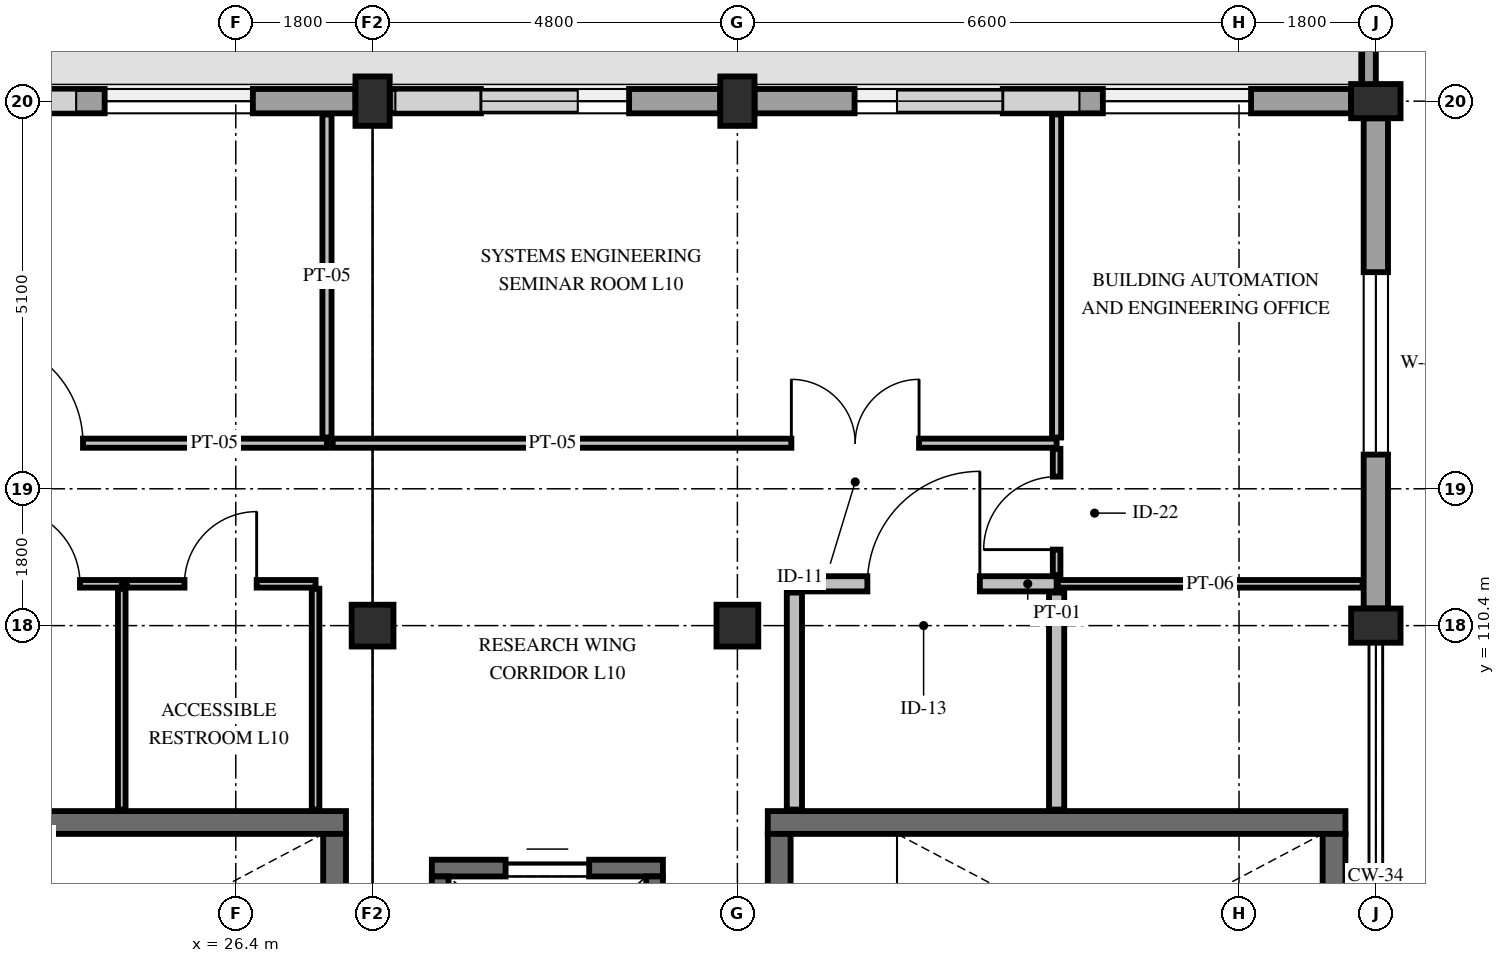
"""IFC4 building model, lengths in metres.
Left out: names, types, materials, properties, quantities, classifications, styles, units other than length and angle.
Written with IfcOpenShell. Run it as: python <this file> out.ifc"""

import sys

from ifc_helpers import new_model, si_unit, direction, frame, frame_2d, origin, origin_2d, place, context, subcontext, project, spatial, rectangle, extrude, element, fill, save


model = new_model("IFC4")
c1 = context("Model", 3, precision=1e-05, world=origin(), true_north=direction((0.0, 1.0)))
c2 = subcontext(c1, "Body", "Model", "MODEL_VIEW")
j1 = project(units=[si_unit("LENGTHUNIT", "METRE"), si_unit("PLANEANGLEUNIT", "RADIAN")], contexts=[c1])
p1 = place(None, origin())
s1 = spatial("IfcSite", under=j1, at=p1, CompositionType="ELEMENT")
p2 = place(p1, origin())
s2 = spatial("IfcBuilding", under=s1, at=p2, CompositionType="ELEMENT")
p3 = place(p2, frame((0.0, 0.0, 46.8)))
s3 = spatial("IfcBuildingStorey", under=s2, at=p3, CompositionType="ELEMENT", Elevation=46.8)
p4 = place(p3, frame((28.2, 110.4, 0.0), z_axis=(0.0, 0.0, 1.0), x_axis=(1.0, 0.0, 0.0)))
e1 = element("IfcColumn", 1, at=p4, inside=s3, PredefinedType="COLUMN", context=c2, shape_type="SweptSolid", body=[
    extrude(rectangle(XDim=0.55, YDim=0.55, at=origin_2d()), origin(), (0.0, 0.0, 1.0), 4.2),
])
p5 = place(p3, frame((28.2, 117.3, 0.0), z_axis=(0.0, 0.0, 1.0), x_axis=(1.0, 0.0, 0.0)))
e2 = element("IfcColumn", 2, at=p5, inside=s3, PredefinedType="PILASTER", context=c2, shape_type="SweptSolid", body=[
    extrude(rectangle(XDim=0.45, YDim=0.65, at=origin_2d()), origin(), (0.0, 0.0, 1.0), 4.2),
])
p6 = place(p3, frame((33.0, 110.4, 0.0), z_axis=(0.0, 0.0, 1.0), x_axis=(1.0, 0.0, 0.0)))
e3 = element("IfcColumn", 3, at=p6, inside=s3, PredefinedType="COLUMN", context=c2, shape_type="SweptSolid", body=[
    extrude(rectangle(XDim=0.55, YDim=0.55, at=origin_2d()), origin(), (0.0, 0.0, 1.0), 4.2),
])
for number, where, z_axis, x_axis in (
    (4, (33.0, 117.3, 0.0), (0.0, 0.0, 1.0), (1.0, 0.0, 0.0)),
    (5, (41.4, 110.4, 0.0), (0.0, 0.0, 1.0), (0.0, 1.0, 0.0)),
    (6, (41.4, 117.3, 0.0), (0.0, 0.0, 1.0), (0.0, 1.0, 0.0)),
):
    element("IfcColumn", number, at=place(p3, frame(where, z_axis=z_axis, x_axis=x_axis)), inside=s3, PredefinedType="PILASTER", context=c2, shape_type="SweptSolid", body=[
        extrude(rectangle(XDim=0.45, YDim=0.65, at=origin_2d()), origin(), (0.0, 0.0, 1.0), 4.2),
    ])
p7 = place(p3, frame((20.025, 117.3, 0.0), z_axis=(0.0, 0.0, 1.0), x_axis=(1.0, 0.0, 0.0)))
e7 = element("IfcWall", 7, at=p7, inside=s3, PredefinedType="STANDARD", context=c2, shape_type="SweptSolid", body=[
    extrude(rectangle(XDim=7.95, YDim=0.32, at=frame_2d((3.975, 0.0))), origin(), (0.0, 0.0, 1.0), 3.33),
])
p8 = place(p7, frame((1.35, 0.0, 0.65)))
e8 = element("IfcOpeningElement", 8, at=p8, cuts=e7, PredefinedType="OPENING", context=c2, shape_type="SweptSolid", body=[
    extrude(rectangle(XDim=1.95, YDim=2.24, at=frame_2d((0.975, 1.12))), frame((0.0, 0.175, 0.0), z_axis=(0.0, -1.0, 0.0), x_axis=(1.0, 0.0, 0.0)), (0.0, 0.0, 1.0), 0.35),
])
p9 = place(p7, frame((4.65, 0.0, 0.65)))
e9 = element("IfcOpeningElement", 9, at=p9, cuts=e7, PredefinedType="OPENING", context=c2, shape_type="SweptSolid", body=[
    extrude(rectangle(XDim=1.95, YDim=2.24, at=frame_2d((0.975, 1.12))), frame((0.0, 0.175, 0.0), z_axis=(0.0, -1.0, 0.0), x_axis=(1.0, 0.0, 0.0)), (0.0, 0.0, 1.0), 0.35),
])
p10 = place(p3, frame((28.425, 117.3, 0.0), z_axis=(0.0, 0.0, 1.0), x_axis=(1.0, 0.0, 0.0)))
e10 = element("IfcWall", 10, at=p10, inside=s3, PredefinedType="STANDARD", context=c2, shape_type="SweptSolid", body=[
    extrude(rectangle(XDim=4.35, YDim=0.32, at=frame_2d((2.175, 0.0))), origin(), (0.0, 0.0, 1.0), 3.35),
])
p11 = place(p10, frame((1.2, 0.0, 0.65)))
e11 = element("IfcOpeningElement", 11, at=p11, cuts=e10, PredefinedType="OPENING", context=c2, shape_type="SweptSolid", body=[
    extrude(rectangle(XDim=1.95, YDim=2.24, at=frame_2d((0.975, 1.12))), frame((0.0, 0.175, 0.0), z_axis=(0.0, -1.0, 0.0), x_axis=(1.0, 0.0, 0.0)), (0.0, 0.0, 1.0), 0.35),
])
p12 = place(p3, frame((33.225, 117.3, 0.0), z_axis=(0.0, 0.0, 1.0), x_axis=(1.0, 0.0, 0.0)))
e12 = element("IfcWall", 12, at=p12, inside=s3, PredefinedType="STANDARD", context=c2, shape_type="SweptSolid", body=[
    extrude(rectangle(XDim=7.85, YDim=0.32, at=frame_2d((3.925, 0.0))), origin(), (0.0, 0.0, 1.0), 3.33),
])
p13 = place(p12, frame((1.317, 0.0, 0.65)))
e13 = element("IfcOpeningElement", 13, at=p13, cuts=e12, PredefinedType="OPENING", context=c2, shape_type="SweptSolid", body=[
    extrude(rectangle(XDim=1.95, YDim=2.24, at=frame_2d((0.975, 1.12))), frame((0.0, 0.175, 0.0), z_axis=(0.0, -1.0, 0.0), x_axis=(1.0, 0.0, 0.0)), (0.0, 0.0, 1.0), 0.35),
])
p14 = place(p12, frame((4.583, 0.0, 0.65)))
e14 = element("IfcOpeningElement", 14, at=p14, cuts=e12, PredefinedType="OPENING", context=c2, shape_type="SweptSolid", body=[
    extrude(rectangle(XDim=1.95, YDim=2.24, at=frame_2d((0.975, 1.12))), frame((0.0, 0.175, 0.0), z_axis=(0.0, -1.0, 0.0), x_axis=(1.0, 0.0, 0.0)), (0.0, 0.0, 1.0), 0.35),
])
p15 = place(p3, frame((41.4, 117.075, 0.0), z_axis=(0.0, 0.0, 1.0), x_axis=(0.0, -1.0, 0.0)))
e15 = element("IfcWall", 15, at=p15, inside=s3, PredefinedType="STANDARD", context=c2, shape_type="SweptSolid", body=[
    extrude(rectangle(XDim=6.45, YDim=0.32, at=frame_2d((3.225, 0.0))), origin(), (0.0, 0.0, 1.0), 3.23),
])
p16 = place(p15, frame((2.025, 0.0, 0.65)))
e16 = element("IfcOpeningElement", 16, at=p16, cuts=e15, PredefinedType="OPENING", context=c2, shape_type="SweptSolid", body=[
    extrude(rectangle(XDim=2.4, YDim=2.24, at=frame_2d((1.2, 1.12))), frame((0.0, 0.175, 0.0), z_axis=(0.0, -1.0, 0.0), x_axis=(1.0, 0.0, 0.0)), (0.0, 0.0, 1.0), 0.35),
])
p17 = place(p3, frame((41.31, 117.48, 0.0), z_axis=(0.0, 0.0, 1.0), x_axis=(0.0, 1.0, 0.0)))
e17 = element("IfcWall", 17, at=p17, inside=s3, PredefinedType="PARAPET", context=c2, shape_type="SweptSolid", body=[
    extrude(rectangle(XDim=4.44, YDim=0.18, at=frame_2d((2.22, 0.0))), origin(), (0.0, 0.0, 1.0), 1.12),
])
p18 = place(p3, frame((20.25, 107.81, 0.0), z_axis=(0.0, 0.0, 1.0), x_axis=(1.0, 0.0, 0.0)))
e18 = element("IfcWall", 18, at=p18, inside=s3, PredefinedType="SHEAR", context=c2, shape_type="SweptSolid", body=[
    extrude(rectangle(XDim=7.6, YDim=0.3, at=frame_2d((3.8, 0.0))), origin(), (0.0, 0.0, 1.0), 3.94),
])
p19 = place(p3, frame((27.7, 104.7, 0.0), z_axis=(0.0, 0.0, 1.0), x_axis=(0.0, 1.0, 0.0)))
e19 = element("IfcWall", 19, at=p19, inside=s3, PredefinedType="SHEAR", context=c2, shape_type="SweptSolid", body=[
    extrude(rectangle(XDim=2.96, YDim=0.3, at=frame_2d((1.48, 0.0))), origin(), (0.0, 0.0, 1.0), 3.94),
])
p20 = place(p3, frame((33.4, 107.81, 0.0), z_axis=(0.0, 0.0, 1.0), x_axis=(1.0, 0.0, 0.0)))
e20 = element("IfcWall", 20, at=p20, inside=s3, PredefinedType="SHEAR", context=c2, shape_type="SweptSolid", body=[
    extrude(rectangle(XDim=7.6, YDim=0.3, at=frame_2d((3.8, 0.0))), origin(), (0.0, 0.0, 1.0), 3.94),
])
p21 = place(p3, frame((33.55, 104.7, 0.0), z_axis=(0.0, 0.0, 1.0), x_axis=(0.0, 1.0, 0.0)))
e21 = element("IfcWall", 21, at=p21, inside=s3, PredefinedType="SHEAR", context=c2, shape_type="SweptSolid", body=[
    extrude(rectangle(XDim=2.96, YDim=0.3, at=frame_2d((1.48, 0.0))), origin(), (0.0, 0.0, 1.0), 3.94),
])
p22 = place(p21, frame((0.94, 0.0, 0.0)))
e22 = element("IfcOpeningElement", 22, at=p22, cuts=e21, PredefinedType="OPENING", context=c2, shape_type="SweptSolid", body=[
    extrude(rectangle(XDim=1.08, YDim=2.2, at=frame_2d((0.54, 1.1))), frame((0.0, 0.165, 0.0), z_axis=(0.0, -1.0, 0.0), x_axis=(1.0, 0.0, 0.0)), (0.0, 0.0, 1.0), 0.33),
])
p23 = place(p3, frame((40.85, 104.7, 0.0), z_axis=(0.0, 0.0, 1.0), x_axis=(0.0, 1.0, 0.0)))
e23 = element("IfcWall", 23, at=p23, inside=s3, PredefinedType="SHEAR", context=c2, shape_type="SweptSolid", body=[
    extrude(rectangle(XDim=2.96, YDim=0.3, at=frame_2d((1.48, 0.0))), origin(), (0.0, 0.0, 1.0), 3.94),
])
p24 = place(p3, frame((28.98, 107.21, 0.0), z_axis=(0.0, 0.0, 1.0), x_axis=(1.0, 0.0, 0.0)))
e24 = element("IfcWall", 24, at=p24, inside=s3, PredefinedType="SHEAR", context=c2, shape_type="SweptSolid", body=[
    extrude(rectangle(XDim=3.04, YDim=0.22, at=frame_2d((1.52, 0.0))), origin(), (0.0, 0.0, 1.0), 3.94),
])
p25 = place(p24, frame((0.97, 0.0, 0.0)))
e25 = element("IfcOpeningElement", 25, at=p25, cuts=e24, PredefinedType="OPENING", context=c2, shape_type="SweptSolid", body=[
    extrude(rectangle(XDim=1.1, YDim=2.2, at=frame_2d((0.55, 1.1))), frame((0.0, 0.125, 0.0), z_axis=(0.0, -1.0, 0.0), x_axis=(1.0, 0.0, 0.0)), (0.0, 0.0, 1.0), 0.25),
])
for number, where, z_axis, x_axis in (
    (26, (29.09, 104.7, 0.0), (0.0, 0.0, 1.0), (0.0, 1.0, 0.0)),
    (27, (31.91, 104.7, 0.0), (0.0, 0.0, 1.0), (0.0, 1.0, 0.0)),
):
    element("IfcWall", number, at=place(p3, frame(where, z_axis=z_axis, x_axis=x_axis)), inside=s3, PredefinedType="SHEAR", context=c2, shape_type="SweptSolid", body=[
        extrude(rectangle(XDim=2.4, YDim=0.22, at=frame_2d((1.2, 0.0))), origin(), (0.0, 0.0, 1.0), 3.94),
    ])
p26 = place(p3, frame((22.815, 110.95, 0.0), z_axis=(0.0, 0.0, 1.0), x_axis=(1.0, 0.0, 0.0)))
e28 = element("IfcWall", 28, at=p26, inside=s3, PredefinedType="PARTITIONING", context=c2, shape_type="SweptSolid", body=[
    extrude(rectangle(XDim=2.085, YDim=0.1, at=frame_2d((1.042, 0.0))), origin(), (0.0, 0.0, 1.0), 3.9),
])
p27 = place(p26, frame((0.535, 0.0, 0.0)))
e29 = element("IfcOpeningElement", 29, at=p27, cuts=e28, PredefinedType="OPENING", context=c2, shape_type="SweptSolid", body=[
    extrude(rectangle(XDim=1.0, YDim=2.15, at=frame_2d((0.5, 1.075))), frame((0.0, 0.065, 0.0), z_axis=(0.0, -1.0, 0.0), x_axis=(1.0, 0.0, 0.0)), (0.0, 0.0, 1.0), 0.13),
])
p28 = place(p3, frame((24.9, 107.98, 0.0), z_axis=(0.0, 0.0, 1.0), x_axis=(0.0, 1.0, 0.0)))
e30 = element("IfcWall", 30, at=p28, inside=s3, PredefinedType="PARTITIONING", context=c2, shape_type="SweptSolid", body=[
    extrude(rectangle(XDim=2.905, YDim=0.1, at=frame_2d((1.453, 0.0))), origin(), (0.0, 0.0, 1.0), 3.23),
])
p29 = place(p3, frame((24.965, 110.95, 0.0), z_axis=(0.0, 0.0, 1.0), x_axis=(1.0, 0.0, 0.0)))
e31 = element("IfcWall", 31, at=p29, inside=s3, PredefinedType="PARTITIONING", context=c2, shape_type="SweptSolid", body=[
    extrude(rectangle(XDim=2.485, YDim=0.1, at=frame_2d((1.242, 0.0))), origin(), (0.0, 0.0, 1.0), 3.9),
])
p30 = place(p29, frame((0.76, 0.0, 0.0)))
e32 = element("IfcOpeningElement", 32, at=p30, cuts=e31, PredefinedType="OPENING", context=c2, shape_type="SweptSolid", body=[
    extrude(rectangle(XDim=0.95, YDim=2.15, at=frame_2d((0.475, 1.075))), frame((0.0, 0.065, 0.0), z_axis=(0.0, -1.0, 0.0), x_axis=(1.0, 0.0, 0.0)), (0.0, 0.0, 1.0), 0.13),
])
p31 = place(p3, frame((27.45, 107.98, 0.0), z_axis=(0.0, 0.0, 1.0), x_axis=(0.0, 1.0, 0.0)))
e33 = element("IfcWall", 33, at=p31, inside=s3, PredefinedType="PARTITIONING", context=c2, shape_type="SweptSolid", body=[
    extrude(rectangle(XDim=2.905, YDim=0.1, at=frame_2d((1.453, 0.0))), origin(), (0.0, 0.0, 1.0), 3.23),
])
p32 = place(p3, frame((33.75, 110.95, 0.0), z_axis=(0.0, 0.0, 1.0), x_axis=(1.0, 0.0, 0.0)))
e34 = element("IfcWall", 34, at=p32, inside=s3, PredefinedType="PARTITIONING", context=c2, shape_type="SweptSolid", body=[
    extrude(rectangle(XDim=3.45, YDim=0.2, at=frame_2d((1.725, 0.0))), origin(), (0.0, 0.0, 1.0), 3.9),
])
p33 = place(p32, frame((0.96, 0.0, 0.0)))
e35 = element("IfcOpeningElement", 35, at=p33, cuts=e34, PredefinedType="OPENING", context=c2, shape_type="SweptSolid", body=[
    extrude(rectangle(XDim=1.48, YDim=2.3, at=frame_2d((0.74, 1.15))), frame((0.0, 0.115, 0.0), z_axis=(0.0, -1.0, 0.0), x_axis=(1.0, 0.0, 0.0)), (0.0, 0.0, 1.0), 0.23),
])
for number, where, z_axis, x_axis in (
    (36, (33.75, 107.98, 0.0), (0.0, 0.0, 1.0), (0.0, 1.0, 0.0)),
    (37, (37.2, 107.98, 0.0), (0.0, 0.0, 1.0), (0.0, 1.0, 0.0)),
):
    element("IfcWall", number, at=place(p3, frame(where, z_axis=z_axis, x_axis=x_axis)), inside=s3, PredefinedType="PARTITIONING", context=c2, shape_type="SweptSolid", body=[
        extrude(rectangle(XDim=2.855, YDim=0.2, at=frame_2d((1.427, 0.0))), origin(), (0.0, 0.0, 1.0), 3.23),
    ])
p34 = place(p3, frame((19.815, 112.8, 0.0), z_axis=(0.0, 0.0, 1.0), x_axis=(1.0, 0.0, 0.0)))
e38 = element("IfcWall", 38, at=p34, inside=s3, PredefinedType="PARTITIONING", context=c2, shape_type="SweptSolid", body=[
    extrude(rectangle(XDim=7.785, YDim=0.12, at=frame_2d((3.893, 0.0))), origin(), (0.0, 0.0, 1.0), 3.53),
])
p35 = place(p34, frame((3.195, 0.0, 0.0)))
e39 = element("IfcOpeningElement", 39, at=p35, cuts=e38, PredefinedType="OPENING", context=c2, shape_type="SweptSolid", body=[
    extrude(rectangle(XDim=1.38, YDim=2.25, at=frame_2d((0.69, 1.125))), frame((0.0, 0.075, 0.0), z_axis=(0.0, -1.0, 0.0), x_axis=(1.0, 0.0, 0.0)), (0.0, 0.0, 1.0), 0.15),
])
p36 = place(p3, frame((27.6, 112.875, 0.0), z_axis=(0.0, 0.0, 1.0), x_axis=(0.0, 1.0, 0.0)))
e40 = element("IfcWall", 40, at=p36, inside=s3, PredefinedType="PARTITIONING", context=c2, shape_type="SweptSolid", body=[
    extrude(rectangle(XDim=4.25, YDim=0.12, at=frame_2d((2.125, 0.0))), origin(), (0.0, 0.0, 1.0), 3.33),
])
p37 = place(p3, frame((27.675, 112.8, 0.0), z_axis=(0.0, 0.0, 1.0), x_axis=(1.0, 0.0, 0.0)))
e41 = element("IfcWall", 41, at=p37, inside=s3, PredefinedType="PARTITIONING", context=c2, shape_type="SweptSolid", body=[
    extrude(rectangle(XDim=9.525, YDim=0.12, at=frame_2d((4.762, 0.0))), origin(), (0.0, 0.0, 1.0), 3.53),
])
p38 = place(p37, frame((6.035, 0.0, 0.0)))
e42 = element("IfcOpeningElement", 42, at=p38, cuts=e41, PredefinedType="OPENING", context=c2, shape_type="SweptSolid", body=[
    extrude(rectangle(XDim=1.68, YDim=2.3, at=frame_2d((0.84, 1.15))), frame((0.0, 0.075, 0.0), z_axis=(0.0, -1.0, 0.0), x_axis=(1.0, 0.0, 0.0)), (0.0, 0.0, 1.0), 0.15),
])
p39 = place(p3, frame((37.2, 112.875, 0.0), z_axis=(0.0, 0.0, 1.0), x_axis=(0.0, 1.0, 0.0)))
e43 = element("IfcWall", 43, at=p39, inside=s3, PredefinedType="PARTITIONING", context=c2, shape_type="SweptSolid", body=[
    extrude(rectangle(XDim=4.25, YDim=0.12, at=frame_2d((2.125, 0.0))), origin(), (0.0, 0.0, 1.0), 3.33),
])
p40 = place(p3, frame((37.215, 110.95, 0.0), z_axis=(0.0, 0.0, 1.0), x_axis=(1.0, 0.0, 0.0)))
e44 = element("IfcWall", 44, at=p40, inside=s3, PredefinedType="PARTITIONING", context=c2, shape_type="SweptSolid", body=[
    extrude(rectangle(XDim=4.01, YDim=0.1, at=frame_2d((2.005, 0.0))), origin(), (0.0, 0.0, 1.0), 3.48),
])
p41 = place(p3, frame((37.2, 111.065, 0.0), z_axis=(0.0, 0.0, 1.0), x_axis=(0.0, 1.0, 0.0)))
e45 = element("IfcWall", 45, at=p41, inside=s3, PredefinedType="PARTITIONING", context=c2, shape_type="SweptSolid", body=[
    extrude(rectangle(XDim=1.66, YDim=0.1, at=frame_2d((0.83, 0.0))), origin(), (0.0, 0.0, 1.0), 3.9),
])
p42 = place(p41, frame((0.335, 0.0, 0.0)))
e46 = element("IfcOpeningElement", 46, at=p42, cuts=e45, PredefinedType="OPENING", context=c2, shape_type="SweptSolid", body=[
    extrude(rectangle(XDim=0.96, YDim=2.15, at=frame_2d((0.48, 1.075))), frame((0.0, 0.065, 0.0), z_axis=(0.0, -1.0, 0.0), x_axis=(1.0, 0.0, 0.0)), (0.0, 0.0, 1.0), 0.13),
])
p43 = place(p9, origin())
e47 = element("IfcWindow", 47, at=p43, inside=s3, PartitioningType="DOUBLE_PANEL_VERTICAL", PredefinedType="WINDOW", context=c2, shape_type="SweptSolid", body=[
    extrude(rectangle(XDim=1.95, YDim=2.24, at=frame_2d((0.975, 1.12))), frame((0.0, 0.03, 0.0), z_axis=(0.0, -1.0, 0.0), x_axis=(1.0, 0.0, 0.0)), (0.0, 0.0, 1.0), 0.06),
])
fill(e9, e47)
p44 = place(p11, origin())
e48 = element("IfcWindow", 48, at=p44, inside=s3, PartitioningType="DOUBLE_PANEL_VERTICAL", PredefinedType="WINDOW", context=c2, shape_type="SweptSolid", body=[
    extrude(rectangle(XDim=1.95, YDim=2.24, at=frame_2d((0.975, 1.12))), frame((0.0, 0.03, 0.0), z_axis=(0.0, -1.0, 0.0), x_axis=(1.0, 0.0, 0.0)), (0.0, 0.0, 1.0), 0.06),
])
fill(e11, e48)
p45 = place(p13, origin())
e49 = element("IfcWindow", 49, at=p45, inside=s3, PartitioningType="DOUBLE_PANEL_VERTICAL", PredefinedType="WINDOW", context=c2, shape_type="SweptSolid", body=[
    extrude(rectangle(XDim=1.95, YDim=2.24, at=frame_2d((0.975, 1.12))), frame((0.0, 0.03, 0.0), z_axis=(0.0, -1.0, 0.0), x_axis=(1.0, 0.0, 0.0)), (0.0, 0.0, 1.0), 0.06),
])
fill(e13, e49)
p46 = place(p14, origin())
e50 = element("IfcWindow", 50, at=p46, inside=s3, PartitioningType="DOUBLE_PANEL_VERTICAL", PredefinedType="WINDOW", context=c2, shape_type="SweptSolid", body=[
    extrude(rectangle(XDim=1.95, YDim=2.24, at=frame_2d((0.975, 1.12))), frame((0.0, 0.03, 0.0), z_axis=(0.0, -1.0, 0.0), x_axis=(1.0, 0.0, 0.0)), (0.0, 0.0, 1.0), 0.06),
])
fill(e14, e50)
p47 = place(p16, origin())
e51 = element("IfcWindow", 51, at=p47, inside=s3, PartitioningType="DOUBLE_PANEL_VERTICAL", PredefinedType="WINDOW", context=c2, shape_type="SweptSolid", body=[
    extrude(rectangle(XDim=2.4, YDim=2.24, at=frame_2d((1.2, 1.12))), frame((0.0, 0.03, 0.0), z_axis=(0.0, -1.0, 0.0), x_axis=(1.0, 0.0, 0.0)), (0.0, 0.0, 1.0), 0.06),
])
fill(e16, e51)
p48 = place(p25, origin())
e52 = element("IfcDoor", 52, at=p48, inside=s3, OperationType="SLIDING_TO_LEFT", PredefinedType="DOOR", context=c2, shape_type="SweptSolid", body=[
    extrude(rectangle(XDim=1.1, YDim=2.2, at=frame_2d((0.55, 1.1))), frame((0.0, 0.025, 0.0), z_axis=(0.0, -1.0, 0.0), x_axis=(1.0, 0.0, 0.0)), (0.0, 0.0, 1.0), 0.05),
])
fill(e25, e52)
p49 = place(p27, origin())
e53 = element("IfcDoor", 53, at=p49, inside=s3, OperationType="SINGLE_SWING_LEFT", PredefinedType="DOOR", context=c2, shape_type="SweptSolid", body=[
    extrude(rectangle(XDim=1.0, YDim=2.15, at=frame_2d((0.5, 1.075))), frame((0.0, 0.025, 0.0), z_axis=(0.0, -1.0, 0.0), x_axis=(1.0, 0.0, 0.0)), (0.0, 0.0, 1.0), 0.05),
])
fill(e29, e53)
p50 = place(p30, origin())
e54 = element("IfcDoor", 54, at=p50, inside=s3, OperationType="SINGLE_SWING_RIGHT", PredefinedType="DOOR", context=c2, shape_type="SweptSolid", body=[
    extrude(rectangle(XDim=0.95, YDim=2.15, at=frame_2d((0.475, 1.075))), frame((0.0, 0.025, 0.0), z_axis=(0.0, -1.0, 0.0), x_axis=(1.0, 0.0, 0.0)), (0.0, 0.0, 1.0), 0.05),
])
fill(e32, e54)
p51 = place(p33, origin())
e55 = element("IfcDoor", 55, at=p51, inside=s3, OperationType="SINGLE_SWING_RIGHT", PredefinedType="DOOR", context=c2, shape_type="SweptSolid", body=[
    extrude(rectangle(XDim=1.48, YDim=2.3, at=frame_2d((0.74, 1.15))), frame((0.0, 0.025, 0.0), z_axis=(0.0, -1.0, 0.0), x_axis=(1.0, 0.0, 0.0)), (0.0, 0.0, 1.0), 0.05),
])
fill(e35, e55)
p52 = place(p35, origin())
e56 = element("IfcDoor", 56, at=p52, inside=s3, OperationType="SINGLE_SWING_LEFT", PredefinedType="DOOR", context=c2, shape_type="SweptSolid", body=[
    extrude(rectangle(XDim=1.38, YDim=2.25, at=frame_2d((0.69, 1.125))), frame((0.0, 0.025, 0.0), z_axis=(0.0, -1.0, 0.0), x_axis=(1.0, 0.0, 0.0)), (0.0, 0.0, 1.0), 0.05),
])
fill(e39, e56)
p53 = place(p38, origin())
e57 = element("IfcDoor", 57, at=p53, inside=s3, OperationType="DOUBLE_DOOR_SINGLE_SWING", PredefinedType="DOOR", context=c2, shape_type="SweptSolid", body=[
    extrude(rectangle(XDim=1.68, YDim=2.3, at=frame_2d((0.84, 1.15))), frame((0.0, 0.025, 0.0), z_axis=(0.0, -1.0, 0.0), x_axis=(1.0, 0.0, 0.0)), (0.0, 0.0, 1.0), 0.05),
])
fill(e42, e57)
p54 = place(p42, origin())
e58 = element("IfcDoor", 58, at=p54, inside=s3, OperationType="SINGLE_SWING_LEFT", PredefinedType="DOOR", context=c2, shape_type="SweptSolid", body=[
    extrude(rectangle(XDim=0.96, YDim=2.15, at=frame_2d((0.48, 1.075))), frame((0.0, 0.025, 0.0), z_axis=(0.0, -1.0, 0.0), x_axis=(1.0, 0.0, 0.0)), (0.0, 0.0, 1.0), 0.05),
])
fill(e46, e58)
save(model, sys.argv[1])
